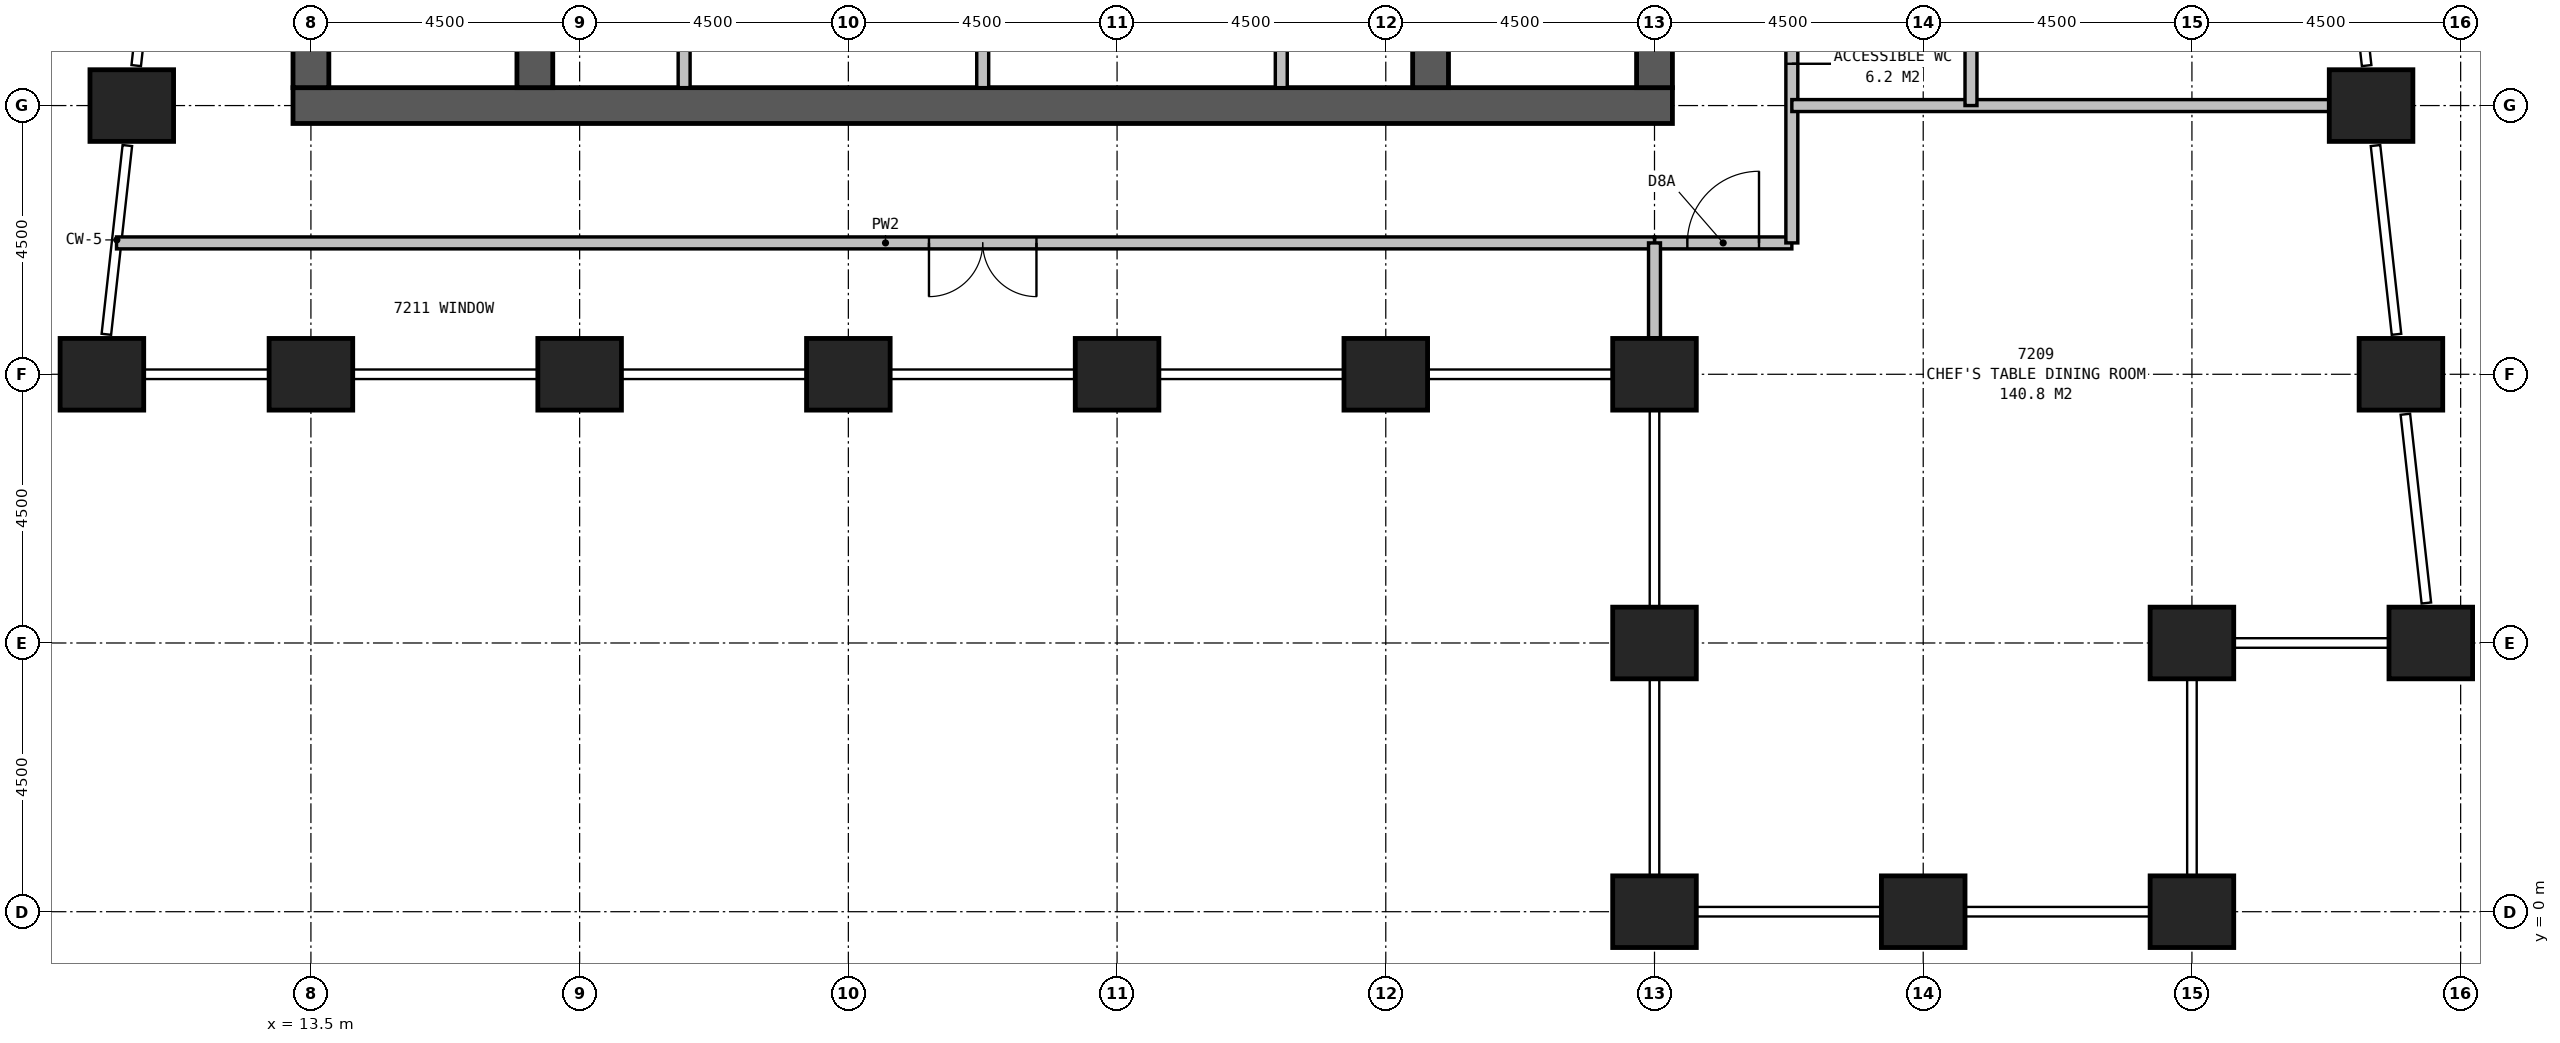
"""IFC4 building model, lengths in metres.
Left out: names, types, materials, properties, quantities, classifications, styles, units other than length and angle.
Written with IfcOpenShell. Run it as: python <this file> out.ifc"""

import sys

from ifc_helpers import new_model, si_unit, direction, frame, frame_2d, origin, origin_2d, place, context, subcontext, project, spatial, rectangle, extrude, element, fill, save


model = new_model("IFC4")
c1 = context("Model", 3, precision=1e-05, world=origin(), true_north=direction((0.0, 1.0)))
c2 = subcontext(c1, "Body", "Model", "MODEL_VIEW")
j1 = project(units=[si_unit("LENGTHUNIT", "METRE"), si_unit("PLANEANGLEUNIT", "RADIAN")], contexts=[c1])
p1 = place(None, origin())
s1 = spatial("IfcSite", under=j1, at=p1, CompositionType="ELEMENT")
p2 = place(p1, origin())
s2 = spatial("IfcBuilding", under=s1, at=p2, CompositionType="ELEMENT")
p3 = place(p2, frame((0.0, 0.0, 281.9)))
s3 = spatial("IfcBuildingStorey", under=s2, at=p3, CompositionType="ELEMENT", Elevation=281.9)
for number, where, z_axis, x_axis in (
    (1, (10.0, 9.0, 0.0), (0.0, 0.0, 1.0), (1.0, 0.0, 0.0)),
    (2, (13.5, 9.0, 0.0), (0.0, 0.0, 1.0), (1.0, 0.0, 0.0)),
    (3, (18.0, 9.0, 0.0), (0.0, 0.0, 1.0), (1.0, 0.0, 0.0)),
    (4, (22.5, 9.0, 0.0), (0.0, 0.0, 1.0), (1.0, 0.0, 0.0)),
    (5, (27.0, 9.0, 0.0), (0.0, 0.0, 1.0), (1.0, 0.0, 0.0)),
    (6, (31.5, 9.0, 0.0), (0.0, 0.0, 1.0), (1.0, 0.0, 0.0)),
    (7, (36.0, 9.0, 0.0), (0.0, 0.0, 1.0), (1.0, 0.0, 0.0)),
    (8, (36.0, 4.5, 0.0), (0.0, 0.0, 1.0), (1.0, 0.0, 0.0)),
    (9, (36.0, 0.0, 0.0), (0.0, 0.0, 1.0), (1.0, 0.0, 0.0)),
    (10, (40.5, 0.0, 0.0), (0.0, 0.0, 1.0), (1.0, 0.0, 0.0)),
    (11, (45.0, 0.0, 0.0), (0.0, 0.0, 1.0), (1.0, 0.0, 0.0)),
    (12, (45.0, 4.5, 0.0), (0.0, 0.0, 1.0), (1.0, 0.0, 0.0)),
    (13, (49.0, 4.5, 0.0), (0.0, 0.0, 1.0), (1.0, 0.0, 0.0)),
    (14, (48.5, 9.0, 0.0), (0.0, 0.0, 1.0), (1.0, 0.0, 0.0)),
    (15, (48.0, 13.5, 0.0), (0.0, 0.0, 1.0), (1.0, 0.0, 0.0)),
    (16, (10.5, 13.5, 0.0), (0.0, 0.0, 1.0), (1.0, 0.0, 0.0)),
):
    element("IfcColumn", number, at=place(p3, frame(where, z_axis=z_axis, x_axis=x_axis)), inside=s3, PredefinedType="COLUMN", context=c2, shape_type="SweptSolid", body=[
        extrude(rectangle(XDim=1.4, YDim=1.2, at=origin_2d()), origin(), (0.0, 0.0, 1.0), 3.9),
    ])
p4 = place(p3, frame((13.2, 13.5, 0.0), z_axis=(0.0, 0.0, 1.0), x_axis=(1.0, 0.0, 0.0)))
e17 = element("IfcWall", 17, at=p4, inside=s3, PredefinedType="SHEAR", context=c2, shape_type="SweptSolid", body=[
    extrude(rectangle(XDim=23.1, YDim=0.6, at=frame_2d((11.55, 0.0))), origin(), (0.0, 0.0, 1.0), 3.9),
])
p5 = place(p3, frame((17.25, 13.8, 0.0), z_axis=(0.0, 0.0, 1.0), x_axis=(0.0, 1.0, 0.0)))
e18 = element("IfcWall", 18, at=p5, inside=s3, PredefinedType="SHEAR", context=c2, shape_type="SweptSolid", body=[
    extrude(rectangle(XDim=12.9, YDim=0.6, at=frame_2d((6.45, 0.0))), origin(), (0.0, 0.0, 1.0), 3.9),
])
p6 = place(p5, frame((3.85, 0.0, 0.0)))
e19 = element("IfcOpeningElement", 19, at=p6, cuts=e18, PredefinedType="OPENING", context=c2, shape_type="SweptSolid", body=[
    extrude(rectangle(XDim=1.2, YDim=2.1, at=frame_2d((0.6, 1.05))), frame((0.0, 0.31, 0.0), z_axis=(0.0, -1.0, 0.0), x_axis=(1.0, 0.0, 0.0)), (0.0, 0.0, 1.0), 0.62),
])
p7 = place(p3, frame((32.25, 13.8, 0.0), z_axis=(0.0, 0.0, 1.0), x_axis=(0.0, 1.0, 0.0)))
e20 = element("IfcWall", 20, at=p7, inside=s3, PredefinedType="SHEAR", context=c2, shape_type="SweptSolid", body=[
    extrude(rectangle(XDim=12.9, YDim=0.6, at=frame_2d((6.45, 0.0))), origin(), (0.0, 0.0, 1.0), 3.9),
])
p8 = place(p7, frame((5.05, 0.0, 0.0), z_axis=(0.0, 0.0, 1.0), x_axis=(-1.0, 0.0, 0.0)))
e21 = element("IfcOpeningElement", 21, at=p8, cuts=e20, PredefinedType="OPENING", context=c2, shape_type="SweptSolid", body=[
    extrude(rectangle(XDim=1.2, YDim=2.1, at=frame_2d((0.6, 1.05))), frame((0.0, 0.31, 0.0), z_axis=(0.0, -1.0, 0.0), x_axis=(1.0, 0.0, 0.0)), (0.0, 0.0, 1.0), 0.62),
])
for number, where, z_axis, x_axis in (
    (22, (13.5, 16.5, 0.0), (0.0, 0.0, 1.0), (0.0, -1.0, 0.0)),
    (23, (36.0, 13.8, 0.0), (0.0, 0.0, 1.0), (0.0, 1.0, 0.0)),
):
    element("IfcWall", number, at=place(p3, frame(where, z_axis=z_axis, x_axis=x_axis)), inside=s3, PredefinedType="SHEAR", context=c2, shape_type="SweptSolid", body=[
        extrude(rectangle(XDim=2.7, YDim=0.6, at=frame_2d((1.35, 0.0))), origin(), (0.0, 0.0, 1.0), 3.9),
    ])
p9 = place(p3, frame((36.0, 11.2, 0.0), z_axis=(0.0, 0.0, 1.0), x_axis=(1.0, 0.0, 0.0)))
e24 = element("IfcWall", 24, at=p9, inside=s3, PredefinedType="PARTITIONING", context=c2, shape_type="SweptSolid", body=[
    extrude(rectangle(XDim=2.3, YDim=0.2, at=frame_2d((1.15, 0.0))), origin(), (0.0, 0.0, 1.0), 3.65),
])
p10 = place(p9, frame((0.55, 0.0, 0.0)))
e25 = element("IfcOpeningElement", 25, at=p10, cuts=e24, PredefinedType="OPENING", context=c2, shape_type="SweptSolid", body=[
    extrude(rectangle(XDim=1.2, YDim=2.1, at=frame_2d((0.6, 1.05))), frame((0.0, 0.11, 0.0), z_axis=(0.0, -1.0, 0.0), x_axis=(1.0, 0.0, 0.0)), (0.0, 0.0, 1.0), 0.22),
])
p11 = place(p3, frame((38.3, 11.2, 0.0), z_axis=(0.0, 0.0, 1.0), x_axis=(0.0, 1.0, 0.0)))
e26 = element("IfcWall", 26, at=p11, inside=s3, PredefinedType="PARTITIONING", context=c2, shape_type="SweptSolid", body=[
    extrude(rectangle(XDim=18.1, YDim=0.2, at=frame_2d((9.05, 0.0))), origin(), (0.0, 0.0, 1.0), 3.65),
])
p12 = place(p11, frame((4.0, 0.0, 0.0), z_axis=(0.0, 0.0, 1.0), x_axis=(-1.0, 0.0, 0.0)))
e27 = element("IfcOpeningElement", 27, at=p12, cuts=e26, PredefinedType="OPENING", context=c2, shape_type="SweptSolid", body=[
    extrude(rectangle(XDim=1.0, YDim=2.1, at=frame_2d((0.5, 1.05))), frame((0.0, 0.11, 0.0), z_axis=(0.0, -1.0, 0.0), x_axis=(1.0, 0.0, 0.0)), (0.0, 0.0, 1.0), 0.22),
])
p13 = place(p11, frame((6.8, 0.0, 0.0), z_axis=(0.0, 0.0, 1.0), x_axis=(-1.0, 0.0, 0.0)))
e28 = element("IfcOpeningElement", 28, at=p13, cuts=e26, PredefinedType="OPENING", context=c2, shape_type="SweptSolid", body=[
    extrude(rectangle(XDim=1.0, YDim=2.1, at=frame_2d((0.5, 1.05))), frame((0.0, 0.11, 0.0), z_axis=(0.0, -1.0, 0.0), x_axis=(1.0, 0.0, 0.0)), (0.0, 0.0, 1.0), 0.22),
])
p14 = place(p11, frame((10.1, 0.0, 0.0), z_axis=(0.0, 0.0, 1.0), x_axis=(-1.0, 0.0, 0.0)))
e29 = element("IfcOpeningElement", 29, at=p14, cuts=e26, PredefinedType="OPENING", context=c2, shape_type="SweptSolid", body=[
    extrude(rectangle(XDim=1.0, YDim=2.1, at=frame_2d((0.5, 1.05))), frame((0.0, 0.11, 0.0), z_axis=(0.0, -1.0, 0.0), x_axis=(1.0, 0.0, 0.0)), (0.0, 0.0, 1.0), 0.22),
])
p15 = place(p11, frame((13.55, 0.0, 0.0), z_axis=(0.0, 0.0, 1.0), x_axis=(-1.0, 0.0, 0.0)))
e30 = element("IfcOpeningElement", 30, at=p15, cuts=e26, PredefinedType="OPENING", context=c2, shape_type="SweptSolid", body=[
    extrude(rectangle(XDim=1.8, YDim=2.4, at=frame_2d((0.9, 1.2))), frame((0.0, 0.11, 0.0), z_axis=(0.0, -1.0, 0.0), x_axis=(1.0, 0.0, 0.0)), (0.0, 0.0, 1.0), 0.22),
])
p16 = place(p3, frame((36.0, 11.2, 0.0), z_axis=(0.0, 0.0, 1.0), x_axis=(0.0, -1.0, 0.0)))
e31 = element("IfcWall", 31, at=p16, inside=s3, PredefinedType="PARTITIONING", context=c2, shape_type="SweptSolid", body=[
    extrude(rectangle(XDim=1.59, YDim=0.2, at=frame_2d((0.795, 0.0))), origin(), (0.0, 0.0, 1.0), 2.65),
])
p17 = place(p3, frame((38.3, 13.5, 0.0), z_axis=(0.0, 0.0, 1.0), x_axis=(1.0, 0.0, 0.0)))
e32 = element("IfcWall", 32, at=p17, inside=s3, PredefinedType="PARTITIONING", context=c2, shape_type="SweptSolid", body=[
    extrude(rectangle(XDim=8.999, YDim=0.2, at=frame_2d((4.5, 0.0))), origin(), (0.0, 0.0, 1.0), 2.35),
])
p18 = place(p3, frame((41.3, 13.5, 0.0), z_axis=(0.0, 0.0, 1.0), x_axis=(0.0, 1.0, 0.0)))
e33 = element("IfcWall", 33, at=p18, inside=s3, PredefinedType="PARTITIONING", context=c2, shape_type="SweptSolid", body=[
    extrude(rectangle(XDim=9.0, YDim=0.2, at=frame_2d((4.5, 0.0))), origin(), (0.0, 0.0, 1.0), 3.65),
])
p19 = place(p3, frame((10.244, 11.2, 0.0), z_axis=(0.0, 0.0, 1.0), x_axis=(1.0, 0.0, 0.0)))
e34 = element("IfcWall", 34, at=p19, inside=s3, PredefinedType="PARTITIONING", context=c2, shape_type="SweptSolid", body=[
    extrude(rectangle(XDim=25.756, YDim=0.2, at=frame_2d((12.878, 0.0))), origin(), (0.0, 0.0, 1.0), 3.65),
])
p20 = place(p19, frame((15.406, 0.0, 0.0), z_axis=(0.0, 0.0, 1.0), x_axis=(-1.0, 0.0, 0.0)))
e35 = element("IfcOpeningElement", 35, at=p20, cuts=e34, PredefinedType="OPENING", context=c2, shape_type="SweptSolid", body=[
    extrude(rectangle(XDim=1.8, YDim=2.4, at=frame_2d((0.9, 1.2))), frame((0.0, 0.11, 0.0), z_axis=(0.0, -1.0, 0.0), x_axis=(1.0, 0.0, 0.0)), (0.0, 0.0, 1.0), 0.22),
])
for number, where, z_axis, x_axis in (
    (36, (19.75, 13.8, 0.0), (0.0, 0.0, 1.0), (0.0, 1.0, 0.0)),
    (37, (24.75, 13.8, 0.0), (0.0, 0.0, 1.0), (0.0, 1.0, 0.0)),
    (38, (29.75, 13.8, 0.0), (0.0, 0.0, 1.0), (0.0, 1.0, 0.0)),
):
    element("IfcWall", number, at=place(p3, frame(where, z_axis=z_axis, x_axis=x_axis)), inside=s3, PredefinedType="PARTITIONING", context=c2, shape_type="SweptSolid", body=[
        extrude(rectangle(XDim=2.4, YDim=0.2, at=frame_2d((1.2, 0.0))), origin(), (0.0, 0.0, 1.0), 3.65),
    ])
p21 = place(p10, origin())
e39 = element("IfcDoor", 39, at=p21, inside=s3, OperationType="SINGLE_SWING_RIGHT", PredefinedType="DOOR", context=c2, shape_type="SweptSolid", body=[
    extrude(rectangle(XDim=1.2, YDim=2.1, at=frame_2d((0.6, 1.05))), frame((0.0, 0.025, 0.0), z_axis=(0.0, -1.0, 0.0), x_axis=(1.0, 0.0, 0.0)), (0.0, 0.0, 1.0), 0.05),
])
fill(e25, e39)
p22 = place(p12, origin())
e40 = element("IfcDoor", 40, at=p22, inside=s3, OperationType="SINGLE_SWING_RIGHT", PredefinedType="DOOR", context=c2, shape_type="SweptSolid", body=[
    extrude(rectangle(XDim=1.0, YDim=2.1, at=frame_2d((0.5, 1.05))), frame((0.0, 0.025, 0.0), z_axis=(0.0, -1.0, 0.0), x_axis=(1.0, 0.0, 0.0)), (0.0, 0.0, 1.0), 0.05),
])
fill(e27, e40)
p23 = place(p20, origin())
e41 = element("IfcDoor", 41, at=p23, inside=s3, OperationType="DOUBLE_DOOR_SINGLE_SWING", PredefinedType="DOOR", context=c2, shape_type="SweptSolid", body=[
    extrude(rectangle(XDim=1.8, YDim=2.4, at=frame_2d((0.9, 1.2))), frame((0.0, 0.025, 0.0), z_axis=(0.0, -1.0, 0.0), x_axis=(1.0, 0.0, 0.0)), (0.0, 0.0, 1.0), 0.05),
])
fill(e35, e41)
save(model, sys.argv[1])
